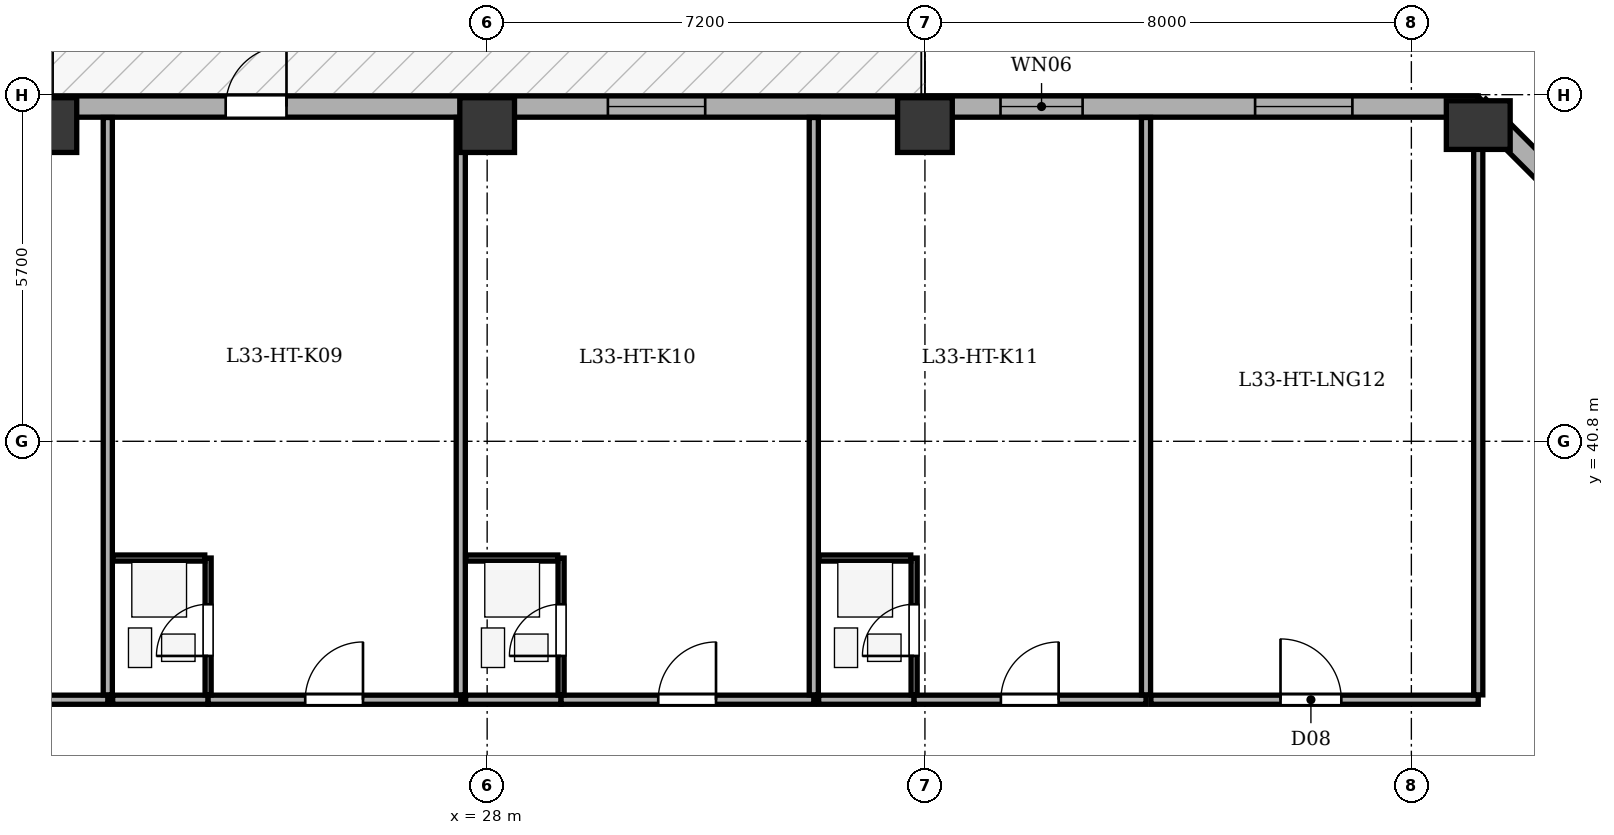
"""IFC4 building model, lengths in metres.
Left out: names, types, materials, properties, quantities, classifications, styles, units other than length and angle.
Written with IfcOpenShell. Run it as: python <this file> out.ifc"""

import sys

from ifc_helpers import new_model, si_unit, direction, frame, frame_2d, origin, origin_2d, place, context, subcontext, project, spatial, rectangle, extrude, element, fill, save


model = new_model("IFC4")
c1 = context("Model", 3, precision=1e-05, world=origin(), true_north=direction((0.0, 1.0)))
c2 = subcontext(c1, "Body", "Model", "MODEL_VIEW")
j1 = project(units=[si_unit("LENGTHUNIT", "METRE"), si_unit("PLANEANGLEUNIT", "RADIAN")], contexts=[c1])
p1 = place(None, origin())
s1 = spatial("IfcSite", under=j1, at=p1, CompositionType="ELEMENT")
p2 = place(p1, origin())
s2 = spatial("IfcBuilding", under=s1, at=p2, CompositionType="ELEMENT")
p3 = place(p2, frame((0.0, 0.0, 134.3)))
s3 = spatial("IfcBuildingStorey", under=s2, at=p3, CompositionType="ELEMENT", Elevation=134.3)
for number, where, z_axis, x_axis in (
    (1, (20.8, 46.0, 0.0), (0.0, 0.0, 1.0), (1.0, 0.0, 0.0)),
    (2, (28.0, 46.0, 0.0), (0.0, 0.0, 1.0), (1.0, 0.0, 0.0)),
    (3, (35.2, 46.0, 0.0), (0.0, 0.0, 1.0), (1.0, 0.0, 0.0)),
):
    element("IfcColumn", number, at=place(p3, frame(where, z_axis=z_axis, x_axis=x_axis)), inside=s3, PredefinedType="COLUMN", context=c2, shape_type="SweptSolid", body=[
        extrude(rectangle(XDim=0.9, YDim=0.9, at=origin_2d()), origin(), (0.0, 0.0, 1.0), 3.5),
    ])
p4 = place(p3, frame((44.3, 46.0, 0.0), z_axis=(0.0, 0.0, 1.0), x_axis=(1.0, 0.0, 0.0)))
e4 = element("IfcColumn", 4, at=p4, inside=s3, PredefinedType="COLUMN", context=c2, shape_type="SweptSolid", body=[
    extrude(rectangle(XDim=0.8, YDim=1.05, at=origin_2d()), origin(), (0.0, 0.0, 1.0), 3.5),
])
p5 = place(p3, frame((9.3, 46.305, 0.0), z_axis=(0.0, 0.0, 1.0), x_axis=(1.0, 0.0, 0.0)))
e5 = element("IfcWall", 5, at=p5, inside=s3, PredefinedType="STANDARD", context=c2, shape_type="SweptSolid", body=[
    extrude(rectangle(XDim=35.0, YDim=0.35, at=frame_2d((17.5, 0.0))), origin(), (0.0, 0.0, 1.0), 2.785),
])
p6 = place(p5, frame((14.4, 0.0, 0.0)))
e6 = element("IfcOpeningElement", 6, at=p6, cuts=e5, PredefinedType="OPENING", context=c2, shape_type="SweptSolid", body=[
    extrude(rectangle(XDim=1.0, YDim=2.02, at=frame_2d((0.5, 1.01))), frame((0.0, 0.185, 0.0), z_axis=(0.0, -1.0, 0.0), x_axis=(1.0, 0.0, 0.0)), (0.0, 0.0, 1.0), 0.37),
])
p7 = place(p5, frame((2.953, 0.0, 0.75)))
e7 = element("IfcOpeningElement", 7, at=p7, cuts=e5, PredefinedType="OPENING", context=c2, shape_type="SweptSolid", body=[
    extrude(rectangle(XDim=1.6, YDim=1.75, at=frame_2d((0.8, 0.875))), frame((0.0, 0.185, 0.0), z_axis=(0.0, -1.0, 0.0), x_axis=(1.0, 0.0, 0.0)), (0.0, 0.0, 1.0), 0.37),
])
p8 = place(p5, frame((8.178, 0.0, 0.75)))
e8 = element("IfcOpeningElement", 8, at=p8, cuts=e5, PredefinedType="OPENING", context=c2, shape_type="SweptSolid", body=[
    extrude(rectangle(XDim=1.6, YDim=1.75, at=frame_2d((0.8, 0.875))), frame((0.0, 0.185, 0.0), z_axis=(0.0, -1.0, 0.0), x_axis=(1.0, 0.0, 0.0)), (0.0, 0.0, 1.0), 0.37),
])
p9 = place(p5, frame((20.686, 0.0, 0.75)))
e9 = element("IfcOpeningElement", 9, at=p9, cuts=e5, PredefinedType="OPENING", context=c2, shape_type="SweptSolid", body=[
    extrude(rectangle(XDim=1.6, YDim=1.75, at=frame_2d((0.8, 0.875))), frame((0.0, 0.185, 0.0), z_axis=(0.0, -1.0, 0.0), x_axis=(1.0, 0.0, 0.0)), (0.0, 0.0, 1.0), 0.37),
])
p10 = place(p5, frame((27.143, 0.0, 0.75)))
e10 = element("IfcOpeningElement", 10, at=p10, cuts=e5, PredefinedType="OPENING", context=c2, shape_type="SweptSolid", body=[
    extrude(rectangle(XDim=1.35, YDim=1.75, at=frame_2d((0.675, 0.875))), frame((0.0, 0.185, 0.0), z_axis=(0.0, -1.0, 0.0), x_axis=(1.0, 0.0, 0.0)), (0.0, 0.0, 1.0), 0.37),
])
p11 = place(p5, frame((31.33, 0.0, 0.75)))
e11 = element("IfcOpeningElement", 11, at=p11, cuts=e5, PredefinedType="OPENING", context=c2, shape_type="SweptSolid", body=[
    extrude(rectangle(XDim=1.6, YDim=1.75, at=frame_2d((0.8, 0.875))), frame((0.0, 0.185, 0.0), z_axis=(0.0, -1.0, 0.0), x_axis=(1.0, 0.0, 0.0)), (0.0, 0.0, 1.0), 0.37),
])
p12 = place(p3, frame((44.3, 46.305, 0.0), z_axis=(0.0, 0.0, 1.0), x_axis=(0.707106781187, -0.707106781187, 0.0)))
e12 = element("IfcWall", 12, at=p12, inside=s3, PredefinedType="STANDARD", context=c2, shape_type="SweptSolid", body=[
    extrude(rectangle(XDim=6.795, YDim=0.35, at=frame_2d((3.397, 0.0))), origin(), (0.0, 0.0, 1.0), 2.785),
])
p13 = place(p12, frame((2.698, 0.0, 0.75)))
e13 = element("IfcOpeningElement", 13, at=p13, cuts=e12, PredefinedType="OPENING", context=c2, shape_type="SweptSolid", body=[
    extrude(rectangle(XDim=1.4, YDim=1.65, at=frame_2d((0.7, 0.825))), frame((0.0, 0.185, 0.0), z_axis=(0.0, -1.0, 0.0), x_axis=(1.0, 0.0, 0.0)), (0.0, 0.0, 1.0), 0.37),
])
p14 = place(p3, frame((17.606, 36.55, 0.0), z_axis=(0.0, 0.0, 1.0), x_axis=(1.0, 0.0, 0.0)))
e14 = element("IfcWall", 14, at=p14, inside=s3, PredefinedType="PARTITIONING", context=c2, shape_type="SweptSolid", body=[
    extrude(rectangle(XDim=4.155, YDim=0.15, at=frame_2d((2.078, 0.0))), origin(), (0.0, 0.0, 1.0), 3.2),
])
p15 = place(p14, frame((1.597, 0.0, 0.0)))
e15 = element("IfcOpeningElement", 15, at=p15, cuts=e14, PredefinedType="OPENING", context=c2, shape_type="SweptSolid", body=[
    extrude(rectangle(XDim=0.95, YDim=2.1, at=frame_2d((0.475, 1.05))), frame((0.0, 0.085, 0.0), z_axis=(0.0, -1.0, 0.0), x_axis=(1.0, 0.0, 0.0)), (0.0, 0.0, 1.0), 0.17),
])
p16 = place(p3, frame((21.761, 36.63, 0.0), z_axis=(0.0, 0.0, 1.0), x_axis=(0.0, 1.0, 0.0)))
e16 = element("IfcWall", 16, at=p16, inside=s3, PredefinedType="PARTITIONING", context=c2, shape_type="SweptSolid", body=[
    extrude(rectangle(XDim=9.495, YDim=0.15, at=frame_2d((4.748, 0.0))), origin(), (0.0, 0.0, 1.0), 3.2),
])
p17 = place(p3, frame((21.841, 36.55, 0.0), z_axis=(0.0, 0.0, 1.0), x_axis=(1.0, 0.0, 0.0)))
e17 = element("IfcWall", 17, at=p17, inside=s3, PredefinedType="PARTITIONING", context=c2, shape_type="SweptSolid", body=[
    extrude(rectangle(XDim=1.57, YDim=0.15, at=frame_2d((0.785, 0.0))), origin(), (0.0, 0.0, 1.0), 3.2),
])
p18 = place(p3, frame((23.411, 36.55, 0.0), z_axis=(0.0, 0.0, 1.0), x_axis=(1.0, 0.0, 0.0)))
e18 = element("IfcWall", 18, at=p18, inside=s3, PredefinedType="PARTITIONING", context=c2, shape_type="SweptSolid", body=[
    extrude(rectangle(XDim=4.155, YDim=0.15, at=frame_2d((2.078, 0.0))), origin(), (0.0, 0.0, 1.0), 3.2),
])
p19 = place(p18, frame((1.597, 0.0, 0.0)))
e19 = element("IfcOpeningElement", 19, at=p19, cuts=e18, PredefinedType="OPENING", context=c2, shape_type="SweptSolid", body=[
    extrude(rectangle(XDim=0.95, YDim=2.1, at=frame_2d((0.475, 1.05))), frame((0.0, 0.085, 0.0), z_axis=(0.0, -1.0, 0.0), x_axis=(1.0, 0.0, 0.0)), (0.0, 0.0, 1.0), 0.17),
])
p20 = place(p3, frame((23.411, 36.63, 0.0), z_axis=(0.0, 0.0, 1.0), x_axis=(0.0, 1.0, 0.0)))
e20 = element("IfcWall", 20, at=p20, inside=s3, PredefinedType="PARTITIONING", context=c2, shape_type="SweptSolid", body=[
    extrude(rectangle(XDim=2.25, YDim=0.1, at=frame_2d((1.125, 0.0))), origin(), (0.0, 0.0, 1.0), 3.2),
])
p21 = place(p20, frame((0.64, 0.0, 0.0)))
e21 = element("IfcOpeningElement", 21, at=p21, cuts=e20, PredefinedType="OPENING", context=c2, shape_type="SweptSolid", body=[
    extrude(rectangle(XDim=0.85, YDim=2.05, at=frame_2d((0.425, 1.025))), frame((0.0, 0.06, 0.0), z_axis=(0.0, -1.0, 0.0), x_axis=(1.0, 0.0, 0.0)), (0.0, 0.0, 1.0), 0.12),
])
p22 = place(p3, frame((21.841, 38.88, 0.0), z_axis=(0.0, 0.0, 1.0), x_axis=(1.0, 0.0, 0.0)))
e22 = element("IfcWall", 22, at=p22, inside=s3, PredefinedType="PARTITIONING", context=c2, shape_type="SweptSolid", body=[
    extrude(rectangle(XDim=1.515, YDim=0.1, at=frame_2d((0.757, 0.0))), origin(), (0.0, 0.0, 1.0), 3.2),
])
p23 = place(p3, frame((27.566, 36.63, 0.0), z_axis=(0.0, 0.0, 1.0), x_axis=(0.0, 1.0, 0.0)))
e23 = element("IfcWall", 23, at=p23, inside=s3, PredefinedType="PARTITIONING", context=c2, shape_type="SweptSolid", body=[
    extrude(rectangle(XDim=9.495, YDim=0.15, at=frame_2d((4.748, 0.0))), origin(), (0.0, 0.0, 1.0), 3.2),
])
p24 = place(p3, frame((27.646, 36.55, 0.0), z_axis=(0.0, 0.0, 1.0), x_axis=(1.0, 0.0, 0.0)))
e24 = element("IfcWall", 24, at=p24, inside=s3, PredefinedType="PARTITIONING", context=c2, shape_type="SweptSolid", body=[
    extrude(rectangle(XDim=1.57, YDim=0.15, at=frame_2d((0.785, 0.0))), origin(), (0.0, 0.0, 1.0), 3.2),
])
p25 = place(p3, frame((29.216, 36.55, 0.0), z_axis=(0.0, 0.0, 1.0), x_axis=(1.0, 0.0, 0.0)))
e25 = element("IfcWall", 25, at=p25, inside=s3, PredefinedType="PARTITIONING", context=c2, shape_type="SweptSolid", body=[
    extrude(rectangle(XDim=4.156, YDim=0.15, at=frame_2d((2.078, 0.0))), origin(), (0.0, 0.0, 1.0), 3.2),
])
p26 = place(p25, frame((1.598, 0.0, 0.0)))
e26 = element("IfcOpeningElement", 26, at=p26, cuts=e25, PredefinedType="OPENING", context=c2, shape_type="SweptSolid", body=[
    extrude(rectangle(XDim=0.95, YDim=2.1, at=frame_2d((0.475, 1.05))), frame((0.0, 0.085, 0.0), z_axis=(0.0, -1.0, 0.0), x_axis=(1.0, 0.0, 0.0)), (0.0, 0.0, 1.0), 0.17),
])
p27 = place(p3, frame((29.216, 36.63, 0.0), z_axis=(0.0, 0.0, 1.0), x_axis=(0.0, 1.0, 0.0)))
e27 = element("IfcWall", 27, at=p27, inside=s3, PredefinedType="PARTITIONING", context=c2, shape_type="SweptSolid", body=[
    extrude(rectangle(XDim=2.25, YDim=0.1, at=frame_2d((1.125, 0.0))), origin(), (0.0, 0.0, 1.0), 3.2),
])
p28 = place(p27, frame((0.64, 0.0, 0.0)))
e28 = element("IfcOpeningElement", 28, at=p28, cuts=e27, PredefinedType="OPENING", context=c2, shape_type="SweptSolid", body=[
    extrude(rectangle(XDim=0.85, YDim=2.05, at=frame_2d((0.425, 1.025))), frame((0.0, 0.06, 0.0), z_axis=(0.0, -1.0, 0.0), x_axis=(1.0, 0.0, 0.0)), (0.0, 0.0, 1.0), 0.12),
])
p29 = place(p3, frame((27.646, 38.88, 0.0), z_axis=(0.0, 0.0, 1.0), x_axis=(1.0, 0.0, 0.0)))
e29 = element("IfcWall", 29, at=p29, inside=s3, PredefinedType="PARTITIONING", context=c2, shape_type="SweptSolid", body=[
    extrude(rectangle(XDim=1.515, YDim=0.1, at=frame_2d((0.757, 0.0))), origin(), (0.0, 0.0, 1.0), 3.2),
])
p30 = place(p3, frame((33.372, 36.63, 0.0), z_axis=(0.0, 0.0, 1.0), x_axis=(0.0, 1.0, 0.0)))
e30 = element("IfcWall", 30, at=p30, inside=s3, PredefinedType="PARTITIONING", context=c2, shape_type="SweptSolid", body=[
    extrude(rectangle(XDim=9.495, YDim=0.15, at=frame_2d((4.748, 0.0))), origin(), (0.0, 0.0, 1.0), 3.2),
])
p31 = place(p3, frame((33.452, 36.55, 0.0), z_axis=(0.0, 0.0, 1.0), x_axis=(1.0, 0.0, 0.0)))
e31 = element("IfcWall", 31, at=p31, inside=s3, PredefinedType="PARTITIONING", context=c2, shape_type="SweptSolid", body=[
    extrude(rectangle(XDim=1.57, YDim=0.15, at=frame_2d((0.785, 0.0))), origin(), (0.0, 0.0, 1.0), 3.2),
])
p32 = place(p3, frame((35.022, 36.55, 0.0), z_axis=(0.0, 0.0, 1.0), x_axis=(1.0, 0.0, 0.0)))
e32 = element("IfcWall", 32, at=p32, inside=s3, PredefinedType="PARTITIONING", context=c2, shape_type="SweptSolid", body=[
    extrude(rectangle(XDim=3.814, YDim=0.15, at=frame_2d((1.907, 0.0))), origin(), (0.0, 0.0, 1.0), 3.2),
])
p33 = place(p32, frame((1.427, 0.0, 0.0)))
e33 = element("IfcOpeningElement", 33, at=p33, cuts=e32, PredefinedType="OPENING", context=c2, shape_type="SweptSolid", body=[
    extrude(rectangle(XDim=0.95, YDim=2.1, at=frame_2d((0.475, 1.05))), frame((0.0, 0.085, 0.0), z_axis=(0.0, -1.0, 0.0), x_axis=(1.0, 0.0, 0.0)), (0.0, 0.0, 1.0), 0.17),
])
p34 = place(p3, frame((35.022, 36.63, 0.0), z_axis=(0.0, 0.0, 1.0), x_axis=(0.0, 1.0, 0.0)))
e34 = element("IfcWall", 34, at=p34, inside=s3, PredefinedType="PARTITIONING", context=c2, shape_type="SweptSolid", body=[
    extrude(rectangle(XDim=2.25, YDim=0.1, at=frame_2d((1.125, 0.0))), origin(), (0.0, 0.0, 1.0), 2.535),
])
p35 = place(p34, frame((0.64, 0.0, 0.0)))
e35 = element("IfcOpeningElement", 35, at=p35, cuts=e34, PredefinedType="OPENING", context=c2, shape_type="SweptSolid", body=[
    extrude(rectangle(XDim=0.85, YDim=2.05, at=frame_2d((0.425, 1.025))), frame((0.0, 0.06, 0.0), z_axis=(0.0, -1.0, 0.0), x_axis=(1.0, 0.0, 0.0)), (0.0, 0.0, 1.0), 0.12),
])
p36 = place(p3, frame((33.452, 38.88, 0.0), z_axis=(0.0, 0.0, 1.0), x_axis=(1.0, 0.0, 0.0)))
e36 = element("IfcWall", 36, at=p36, inside=s3, PredefinedType="PARTITIONING", context=c2, shape_type="SweptSolid", body=[
    extrude(rectangle(XDim=1.515, YDim=0.1, at=frame_2d((0.758, 0.0))), origin(), (0.0, 0.0, 1.0), 3.2),
])
p37 = place(p3, frame((38.836, 36.63, 0.0), z_axis=(0.0, 0.0, 1.0), x_axis=(0.0, 1.0, 0.0)))
e37 = element("IfcWall", 37, at=p37, inside=s3, PredefinedType="PARTITIONING", context=c2, shape_type="SweptSolid", body=[
    extrude(rectangle(XDim=9.495, YDim=0.15, at=frame_2d((4.748, 0.0))), origin(), (0.0, 0.0, 1.0), 3.2),
])
p38 = place(p3, frame((38.916, 36.55, 0.0), z_axis=(0.0, 0.0, 1.0), x_axis=(1.0, 0.0, 0.0)))
e38 = element("IfcWall", 38, at=p38, inside=s3, PredefinedType="PARTITIONING", context=c2, shape_type="SweptSolid", body=[
    extrude(rectangle(XDim=5.384, YDim=0.15, at=frame_2d((2.692, 0.0))), origin(), (0.0, 0.0, 1.0), 3.2),
])
p39 = place(p38, frame((2.132, 0.0, 0.0)))
e39 = element("IfcOpeningElement", 39, at=p39, cuts=e38, PredefinedType="OPENING", context=c2, shape_type="SweptSolid", body=[
    extrude(rectangle(XDim=1.0, YDim=2.1, at=frame_2d((0.5, 1.05))), frame((0.0, 0.085, 0.0), z_axis=(0.0, -1.0, 0.0), x_axis=(1.0, 0.0, 0.0)), (0.0, 0.0, 1.0), 0.17),
])
p40 = place(p3, frame((44.3, 36.63, 0.0), z_axis=(0.0, 0.0, 1.0), x_axis=(0.0, 1.0, 0.0)))
e40 = element("IfcWall", 40, at=p40, inside=s3, PredefinedType="PARTITIONING", context=c2, shape_type="SweptSolid", body=[
    extrude(rectangle(XDim=9.495, YDim=0.15, at=frame_2d((4.748, 0.0))), origin(), (0.0, 0.0, 1.0), 3.2),
])
p41 = place(p6, origin())
e41 = element("IfcDoor", 41, at=p41, inside=s3, OperationType="SINGLE_SWING_RIGHT", PredefinedType="DOOR", context=c2, shape_type="SweptSolid", body=[
    extrude(rectangle(XDim=1.0, YDim=2.02, at=frame_2d((0.5, 1.01))), frame((0.0, 0.025, 0.0), z_axis=(0.0, -1.0, 0.0), x_axis=(1.0, 0.0, 0.0)), (0.0, 0.0, 1.0), 0.05),
])
fill(e6, e41)
p42 = place(p9, origin())
e42 = element("IfcWindow", 42, at=p42, inside=s3, PartitioningType="SINGLE_PANEL", PredefinedType="WINDOW", context=c2, shape_type="SweptSolid", body=[
    extrude(rectangle(XDim=1.6, YDim=1.75, at=frame_2d((0.8, 0.875))), frame((0.0, -0.01, 0.0), z_axis=(0.0, -1.0, 0.0), x_axis=(1.0, 0.0, 0.0)), (0.0, 0.0, 1.0), 0.06),
])
fill(e9, e42)
p43 = place(p10, origin())
e43 = element("IfcWindow", 43, at=p43, inside=s3, PartitioningType="SINGLE_PANEL", PredefinedType="WINDOW", context=c2, shape_type="SweptSolid", body=[
    extrude(rectangle(XDim=1.35, YDim=1.75, at=frame_2d((0.675, 0.875))), frame((0.0, -0.01, 0.0), z_axis=(0.0, -1.0, 0.0), x_axis=(1.0, 0.0, 0.0)), (0.0, 0.0, 1.0), 0.06),
])
fill(e10, e43)
p44 = place(p11, origin())
e44 = element("IfcWindow", 44, at=p44, inside=s3, PartitioningType="SINGLE_PANEL", PredefinedType="WINDOW", context=c2, shape_type="SweptSolid", body=[
    extrude(rectangle(XDim=1.6, YDim=1.75, at=frame_2d((0.8, 0.875))), frame((0.0, -0.01, 0.0), z_axis=(0.0, -1.0, 0.0), x_axis=(1.0, 0.0, 0.0)), (0.0, 0.0, 1.0), 0.06),
])
fill(e11, e44)
p45 = place(p21, origin())
e45 = element("IfcDoor", 45, at=p45, inside=s3, OperationType="SINGLE_SWING_LEFT", PredefinedType="DOOR", context=c2, shape_type="SweptSolid", body=[
    extrude(rectangle(XDim=0.85, YDim=2.05, at=frame_2d((0.425, 1.025))), frame((0.0, 0.025, 0.0), z_axis=(0.0, -1.0, 0.0), x_axis=(1.0, 0.0, 0.0)), (0.0, 0.0, 1.0), 0.05),
])
fill(e21, e45)
p46 = place(p19, origin())
e46 = element("IfcDoor", 46, at=p46, inside=s3, OperationType="SINGLE_SWING_RIGHT", PredefinedType="DOOR", context=c2, shape_type="SweptSolid", body=[
    extrude(rectangle(XDim=0.95, YDim=2.1, at=frame_2d((0.475, 1.05))), frame((0.0, 0.025, 0.0), z_axis=(0.0, -1.0, 0.0), x_axis=(1.0, 0.0, 0.0)), (0.0, 0.0, 1.0), 0.05),
])
fill(e19, e46)
p47 = place(p28, origin())
e47 = element("IfcDoor", 47, at=p47, inside=s3, OperationType="SINGLE_SWING_LEFT", PredefinedType="DOOR", context=c2, shape_type="SweptSolid", body=[
    extrude(rectangle(XDim=0.85, YDim=2.05, at=frame_2d((0.425, 1.025))), frame((0.0, 0.025, 0.0), z_axis=(0.0, -1.0, 0.0), x_axis=(1.0, 0.0, 0.0)), (0.0, 0.0, 1.0), 0.05),
])
fill(e28, e47)
p48 = place(p26, origin())
e48 = element("IfcDoor", 48, at=p48, inside=s3, OperationType="SINGLE_SWING_RIGHT", PredefinedType="DOOR", context=c2, shape_type="SweptSolid", body=[
    extrude(rectangle(XDim=0.95, YDim=2.1, at=frame_2d((0.475, 1.05))), frame((0.0, 0.025, 0.0), z_axis=(0.0, -1.0, 0.0), x_axis=(1.0, 0.0, 0.0)), (0.0, 0.0, 1.0), 0.05),
])
fill(e26, e48)
p49 = place(p35, origin())
e49 = element("IfcDoor", 49, at=p49, inside=s3, OperationType="SINGLE_SWING_LEFT", PredefinedType="DOOR", context=c2, shape_type="SweptSolid", body=[
    extrude(rectangle(XDim=0.85, YDim=2.05, at=frame_2d((0.425, 1.025))), frame((0.0, 0.025, 0.0), z_axis=(0.0, -1.0, 0.0), x_axis=(1.0, 0.0, 0.0)), (0.0, 0.0, 1.0), 0.05),
])
fill(e35, e49)
p50 = place(p33, origin())
e50 = element("IfcDoor", 50, at=p50, inside=s3, OperationType="SINGLE_SWING_RIGHT", PredefinedType="DOOR", context=c2, shape_type="SweptSolid", body=[
    extrude(rectangle(XDim=0.95, YDim=2.1, at=frame_2d((0.475, 1.05))), frame((0.0, 0.025, 0.0), z_axis=(0.0, -1.0, 0.0), x_axis=(1.0, 0.0, 0.0)), (0.0, 0.0, 1.0), 0.05),
])
fill(e33, e50)
p51 = place(p39, origin())
e51 = element("IfcDoor", 51, at=p51, inside=s3, OperationType="SINGLE_SWING_LEFT", PredefinedType="DOOR", context=c2, shape_type="SweptSolid", body=[
    extrude(rectangle(XDim=1.0, YDim=2.1, at=frame_2d((0.5, 1.05))), frame((0.0, 0.025, 0.0), z_axis=(0.0, -1.0, 0.0), x_axis=(1.0, 0.0, 0.0)), (0.0, 0.0, 1.0), 0.05),
])
fill(e39, e51)
save(model, sys.argv[1])
